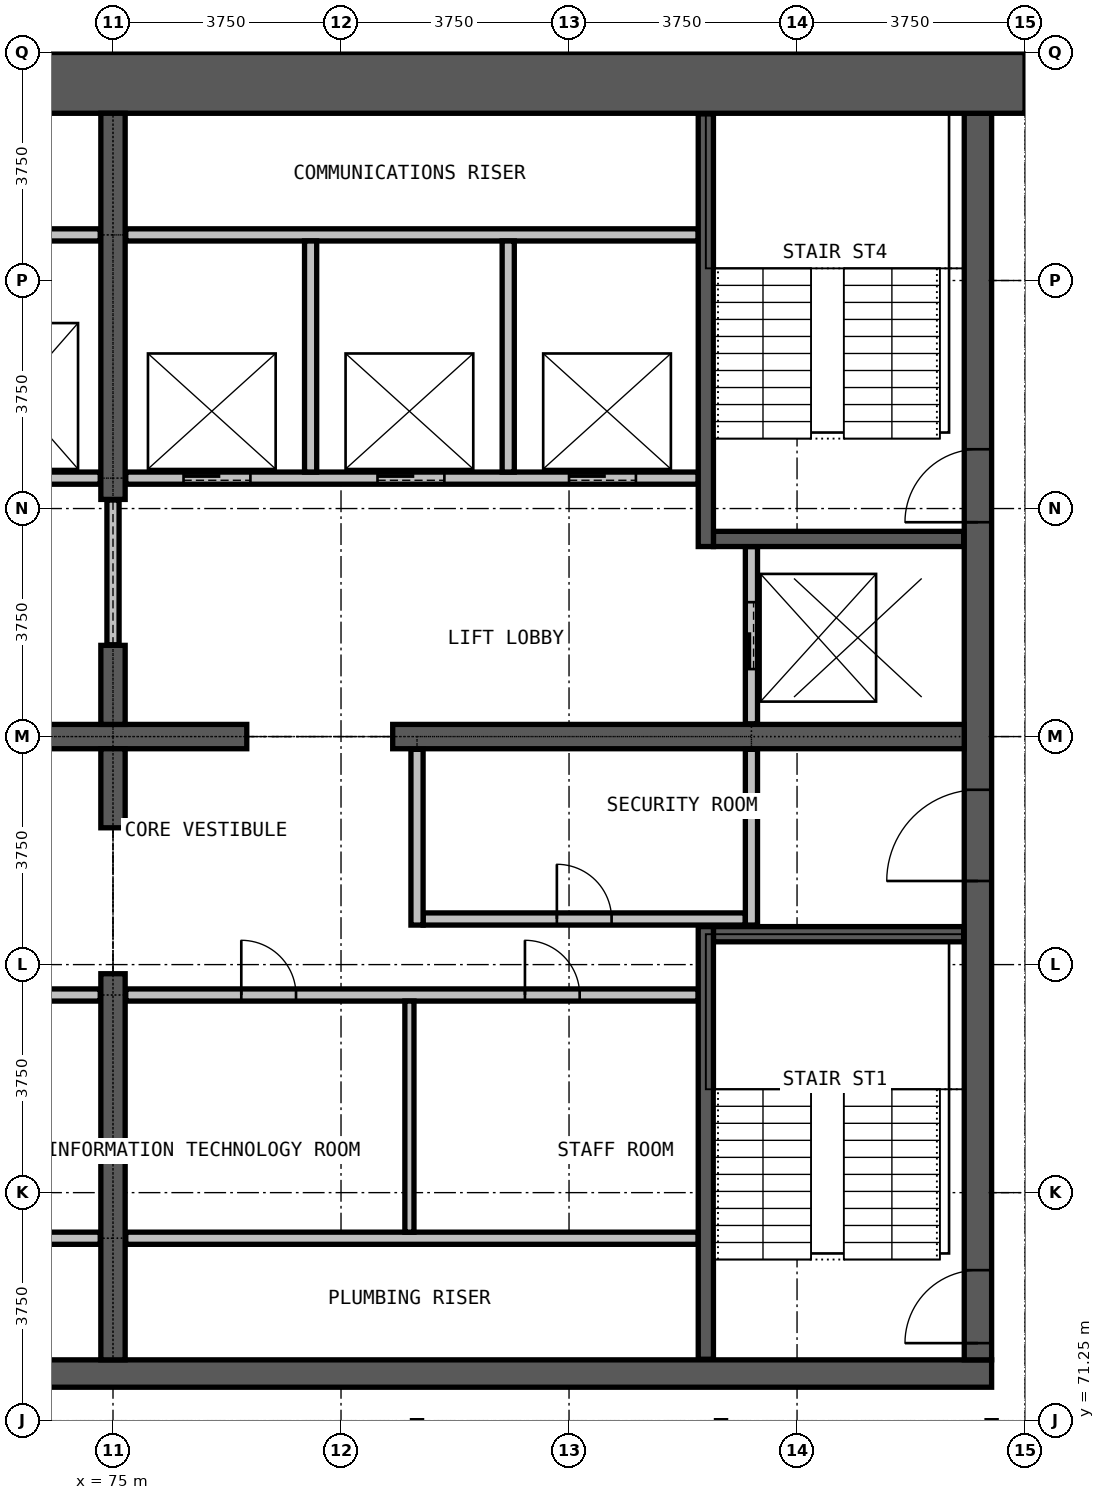
"""IFC4 building model, lengths in metres.
Left out: names, types, materials, properties, quantities, classifications, styles, units other than length and angle.
Written with IfcOpenShell. Run it as: python <this file> out.ifc"""

import sys

from ifc_helpers import new_model, si_unit, direction, frame, frame_2d, origin, place, context, subcontext, project, spatial, rectangle, extrude, element, fill, save


model = new_model("IFC4")
c1 = context("Model", 3, precision=1e-05, world=origin(), true_north=direction((0.0, 1.0)))
c2 = subcontext(c1, "Body", "Model", "MODEL_VIEW")
j1 = project(units=[si_unit("LENGTHUNIT", "METRE"), si_unit("PLANEANGLEUNIT", "RADIAN")], contexts=[c1])
p1 = place(None, origin())
s1 = spatial("IfcSite", under=j1, at=p1, CompositionType="ELEMENT")
p2 = place(p1, origin())
s2 = spatial("IfcBuilding", under=s1, at=p2, CompositionType="ELEMENT")
p3 = place(p2, frame((0.0, 0.0, 265.7)))
s3 = spatial("IfcBuildingStorey", under=s2, at=p3, CompositionType="ELEMENT", Elevation=265.7)
p4 = place(p3, frame((60.55, 72.025, 0.0), z_axis=(0.0, 0.0, 1.0), x_axis=(1.0, 0.0, 0.0)))
e1 = element("IfcWall", 1, at=p4, inside=s3, PredefinedType="SHEAR", context=c2, shape_type="SweptSolid", body=[
    extrude(rectangle(XDim=28.9, YDim=0.45, at=frame_2d((14.45, 0.0))), origin(), (0.0, 0.0, 1.0), 3.6),
])
p5 = place(p3, frame((89.225, 72.25, 0.0), z_axis=(0.0, 0.0, 1.0), x_axis=(0.0, 1.0, 0.0)))
e2 = element("IfcWall", 2, at=p5, inside=s3, PredefinedType="SHEAR", context=c2, shape_type="SweptSolid", body=[
    extrude(rectangle(XDim=20.5, YDim=0.45, at=frame_2d((10.25, 0.0))), origin(), (0.0, 0.0, 1.0), 3.6),
])
p6 = place(p5, frame((0.275, 0.0, 0.0)))
e3 = element("IfcOpeningElement", 3, at=p6, cuts=e2, PredefinedType="OPENING", context=c2, shape_type="SweptSolid", body=[
    extrude(rectangle(XDim=1.2, YDim=2.2, at=frame_2d((0.6, 1.1))), frame((0.0, 0.235, 0.0), z_axis=(0.0, -1.0, 0.0), x_axis=(1.0, 0.0, 0.0)), (0.0, 0.0, 1.0), 0.47),
])
p7 = place(p5, frame((13.775, 0.0, 0.0)))
e4 = element("IfcOpeningElement", 4, at=p7, cuts=e2, PredefinedType="OPENING", context=c2, shape_type="SweptSolid", body=[
    extrude(rectangle(XDim=1.2, YDim=2.2, at=frame_2d((0.6, 1.1))), frame((0.0, 0.235, 0.0), z_axis=(0.0, -1.0, 0.0), x_axis=(1.0, 0.0, 0.0)), (0.0, 0.0, 1.0), 0.47),
])
p8 = place(p5, frame((7.875, 0.0, 0.0)))
e5 = element("IfcOpeningElement", 5, at=p8, cuts=e2, PredefinedType="OPENING", context=c2, shape_type="SweptSolid", body=[
    extrude(rectangle(XDim=1.5, YDim=2.2, at=frame_2d((0.75, 1.1))), frame((0.0, 0.235, 0.0), z_axis=(0.0, -1.0, 0.0), x_axis=(1.0, 0.0, 0.0)), (0.0, 0.0, 1.0), 0.47),
])
p9 = place(p3, frame((90.0, 93.25, 0.0), z_axis=(0.0, 0.0, 1.0), x_axis=(-1.0, 0.0, 0.0)))
e6 = element("IfcWall", 6, at=p9, inside=s3, PredefinedType="SHEAR", context=c2, shape_type="SweptSolid", body=[
    extrude(rectangle(XDim=30.0, YDim=1.0, at=frame_2d((15.0, 0.0))), origin(), (0.0, 0.0, 1.0), 3.6),
])
p10 = place(p3, frame((72.8, 82.5, 0.0), z_axis=(0.0, 0.0, 1.0), x_axis=(1.0, 0.0, 0.0)))
e7 = element("IfcWall", 7, at=p10, inside=s3, PredefinedType="SHEAR", context=c2, shape_type="SweptSolid", body=[
    extrude(rectangle(XDim=4.4, YDim=0.4, at=frame_2d((2.2, 0.0))), origin(), (0.0, 0.0, 1.0), 3.6),
])
p11 = place(p3, frame((79.6, 82.5, 0.0), z_axis=(0.0, 0.0, 1.0), x_axis=(1.0, 0.0, 0.0)))
e8 = element("IfcWall", 8, at=p11, inside=s3, PredefinedType="SHEAR", context=c2, shape_type="SweptSolid", body=[
    extrude(rectangle(XDim=9.4, YDim=0.4, at=frame_2d((4.7, 0.0))), origin(), (0.0, 0.0, 1.0), 3.6),
])
p12 = place(p3, frame((75.0, 72.25, 0.0), z_axis=(0.0, 0.0, 1.0), x_axis=(0.0, 1.0, 0.0)))
e9 = element("IfcWall", 9, at=p12, inside=s3, PredefinedType="SHEAR", context=c2, shape_type="SweptSolid", body=[
    extrude(rectangle(XDim=6.35, YDim=0.4, at=frame_2d((3.175, 0.0))), origin(), (0.0, 0.0, 1.0), 3.6),
])
for number, where, z_axis, x_axis in (
    (10, (75.0, 81.0, 0.0), (0.0, 0.0, 1.0), (0.0, 1.0, 0.0)),
    (11, (75.0, 82.7, 0.0), (0.0, 0.0, 1.0), (0.0, 1.0, 0.0)),
):
    element("IfcWall", number, at=place(p3, frame(where, z_axis=z_axis, x_axis=x_axis)), inside=s3, PredefinedType="SHEAR", context=c2, shape_type="SweptSolid", body=[
        extrude(rectangle(XDim=1.3, YDim=0.4, at=frame_2d((0.65, 0.0))), origin(), (0.0, 0.0, 1.0), 3.6),
    ])
p13 = place(p3, frame((75.0, 86.4, 0.0), z_axis=(0.0, 0.0, 1.0), x_axis=(0.0, 1.0, 0.0)))
e12 = element("IfcWall", 12, at=p13, inside=s3, PredefinedType="SHEAR", context=c2, shape_type="SweptSolid", body=[
    extrude(rectangle(XDim=6.35, YDim=0.4, at=frame_2d((3.175, 0.0))), origin(), (0.0, 0.0, 1.0), 3.6),
])
for number, where, z_axis, x_axis in (
    (13, (65.375, 74.25, 0.0), (0.0, 0.0, 1.0), (1.0, 0.0, 0.0)),
    (14, (75.21, 74.25, 0.0), (0.0, 0.0, 1.0), (1.0, 0.0, 0.0)),
):
    element("IfcWall", number, at=place(p3, frame(where, z_axis=z_axis, x_axis=x_axis)), inside=s3, PredefinedType="PARTITIONING", context=c2, shape_type="SweptSolid", body=[
        extrude(rectangle(XDim=9.415, YDim=0.2, at=frame_2d((4.708, 0.0))), origin(), (0.0, 0.0, 1.0), 3.3),
    ])
p14 = place(p3, frame((65.375, 78.25, 0.0), z_axis=(0.0, 0.0, 1.0), x_axis=(1.0, 0.0, 0.0)))
e15 = element("IfcWall", 15, at=p14, inside=s3, PredefinedType="PARTITIONING", context=c2, shape_type="SweptSolid", body=[
    extrude(rectangle(XDim=9.415, YDim=0.2, at=frame_2d((4.708, 0.0))), origin(), (0.0, 0.0, 1.0), 3.3),
])
p15 = place(p14, frame((1.0, 0.0, 0.0)))
e16 = element("IfcOpeningElement", 16, at=p15, cuts=e15, PredefinedType="OPENING", context=c2, shape_type="SweptSolid", body=[
    extrude(rectangle(XDim=0.9, YDim=2.2, at=frame_2d((0.45, 1.1))), frame((0.0, 0.11, 0.0), z_axis=(0.0, -1.0, 0.0), x_axis=(1.0, 0.0, 0.0)), (0.0, 0.0, 1.0), 0.22),
])
p16 = place(p14, frame((5.665, 0.0, 0.0)))
e17 = element("IfcOpeningElement", 17, at=p16, cuts=e15, PredefinedType="OPENING", context=c2, shape_type="SweptSolid", body=[
    extrude(rectangle(XDim=0.9, YDim=2.2, at=frame_2d((0.45, 1.1))), frame((0.0, 0.11, 0.0), z_axis=(0.0, -1.0, 0.0), x_axis=(1.0, 0.0, 0.0)), (0.0, 0.0, 1.0), 0.22),
])
p17 = place(p3, frame((75.21, 78.25, 0.0), z_axis=(0.0, 0.0, 1.0), x_axis=(1.0, 0.0, 0.0)))
e18 = element("IfcWall", 18, at=p17, inside=s3, PredefinedType="PARTITIONING", context=c2, shape_type="SweptSolid", body=[
    extrude(rectangle(XDim=9.415, YDim=0.2, at=frame_2d((4.708, 0.0))), origin(), (0.0, 0.0, 1.0), 3.3),
])
p18 = place(p17, frame((1.9, 0.0, 0.0)))
e19 = element("IfcOpeningElement", 19, at=p18, cuts=e18, PredefinedType="OPENING", context=c2, shape_type="SweptSolid", body=[
    extrude(rectangle(XDim=0.9, YDim=2.2, at=frame_2d((0.45, 1.1))), frame((0.0, 0.11, 0.0), z_axis=(0.0, -1.0, 0.0), x_axis=(1.0, 0.0, 0.0)), (0.0, 0.0, 1.0), 0.22),
])
p19 = place(p17, frame((6.565, 0.0, 0.0)))
e20 = element("IfcOpeningElement", 20, at=p19, cuts=e18, PredefinedType="OPENING", context=c2, shape_type="SweptSolid", body=[
    extrude(rectangle(XDim=0.9, YDim=2.2, at=frame_2d((0.45, 1.1))), frame((0.0, 0.11, 0.0), z_axis=(0.0, -1.0, 0.0), x_axis=(1.0, 0.0, 0.0)), (0.0, 0.0, 1.0), 0.22),
])
p20 = place(p3, frame((80.1, 79.5, 0.0), z_axis=(0.0, 0.0, 1.0), x_axis=(1.0, 0.0, 0.0)))
e21 = element("IfcWall", 21, at=p20, inside=s3, PredefinedType="PARTITIONING", context=c2, shape_type="SweptSolid", body=[
    extrude(rectangle(XDim=5.3, YDim=0.2, at=frame_2d((2.65, 0.0))), origin(), (0.0, 0.0, 1.0), 3.3),
])
p21 = place(p20, frame((2.2, 0.0, 0.0)))
e22 = element("IfcOpeningElement", 22, at=p21, cuts=e21, PredefinedType="OPENING", context=c2, shape_type="SweptSolid", body=[
    extrude(rectangle(XDim=0.9, YDim=2.2, at=frame_2d((0.45, 1.1))), frame((0.0, 0.11, 0.0), z_axis=(0.0, -1.0, 0.0), x_axis=(1.0, 0.0, 0.0)), (0.0, 0.0, 1.0), 0.22),
])
p22 = place(p3, frame((75.0, 84.01, 0.0), z_axis=(0.0, 0.0, 1.0), x_axis=(0.0, 1.0, 0.0)))
e23 = element("IfcWall", 23, at=p22, inside=s3, PredefinedType="PARTITIONING", context=c2, shape_type="SweptSolid", body=[
    extrude(rectangle(XDim=2.38, YDim=0.2, at=frame_2d((1.19, 0.0))), origin(), (0.0, 0.0, 1.0), 2.4),
])
for number, where, z_axis, x_axis in (
    (24, (80.0, 79.4, 0.0), (0.0, 0.0, 1.0), (0.0, 1.0, 0.0)),
    (25, (85.5, 79.4, 0.0), (0.0, 0.0, 1.0), (0.0, 1.0, 0.0)),
):
    element("IfcWall", number, at=place(p3, frame(where, z_axis=z_axis, x_axis=x_axis)), inside=s3, PredefinedType="PARTITIONING", context=c2, shape_type="SweptSolid", body=[
        extrude(rectangle(XDim=2.89, YDim=0.2, at=frame_2d((1.445, 0.0))), origin(), (0.0, 0.0, 1.0), 3.3),
    ])
p23 = place(p3, frame((79.875, 74.35, 0.0), z_axis=(0.0, 0.0, 1.0), x_axis=(0.0, 1.0, 0.0)))
e26 = element("IfcWall", 26, at=p23, inside=s3, PredefinedType="PARTITIONING", context=c2, shape_type="SweptSolid", body=[
    extrude(rectangle(XDim=3.8, YDim=0.15, at=frame_2d((1.9, 0.0))), origin(), (0.0, 0.0, 1.0), 3.3),
])
p24 = place(p3, frame((89.45, 67.425, 0.0), z_axis=(0.0, 0.0, 1.0), x_axis=(0.0, 1.0, 0.0)))
e27 = element("IfcWall", 27, at=p24, inside=s3, PredefinedType="PARTITIONING", context=c2, shape_type="SweptSolid", body=[
    extrude(rectangle(XDim=3.825, YDim=0.15, at=frame_2d((1.913, 0.0))), origin(), (0.0, 0.0, 1.0), 3.3),
])
p25 = place(p3, frame((65.375, 86.75, 0.0), z_axis=(0.0, 0.0, 1.0), x_axis=(1.0, 0.0, 0.0)))
e28 = element("IfcWall", 28, at=p25, inside=s3, PredefinedType="PARTITIONING", context=c2, shape_type="SweptSolid", body=[
    extrude(rectangle(XDim=9.415, YDim=0.2, at=frame_2d((4.708, 0.0))), origin(), (0.0, 0.0, 1.0), 3.3),
])
p26 = place(p25, frame((1.0, 0.0, 0.0)))
e29 = element("IfcOpeningElement", 29, at=p26, cuts=e28, PredefinedType="OPENING", context=c2, shape_type="SweptSolid", body=[
    extrude(rectangle(XDim=1.1, YDim=2.2, at=frame_2d((0.55, 1.1))), frame((0.0, 0.11, 0.0), z_axis=(0.0, -1.0, 0.0), x_axis=(1.0, 0.0, 0.0)), (0.0, 0.0, 1.0), 0.22),
])
p27 = place(p25, frame((4.175, 0.0, 0.0)))
e30 = element("IfcOpeningElement", 30, at=p27, cuts=e28, PredefinedType="OPENING", context=c2, shape_type="SweptSolid", body=[
    extrude(rectangle(XDim=1.1, YDim=2.2, at=frame_2d((0.55, 1.1))), frame((0.0, 0.11, 0.0), z_axis=(0.0, -1.0, 0.0), x_axis=(1.0, 0.0, 0.0)), (0.0, 0.0, 1.0), 0.22),
])
p28 = place(p25, frame((7.325, 0.0, 0.0)))
e31 = element("IfcOpeningElement", 31, at=p28, cuts=e28, PredefinedType="OPENING", context=c2, shape_type="SweptSolid", body=[
    extrude(rectangle(XDim=1.1, YDim=2.2, at=frame_2d((0.55, 1.1))), frame((0.0, 0.11, 0.0), z_axis=(0.0, -1.0, 0.0), x_axis=(1.0, 0.0, 0.0)), (0.0, 0.0, 1.0), 0.22),
])
p29 = place(p3, frame((75.21, 86.75, 0.0), z_axis=(0.0, 0.0, 1.0), x_axis=(1.0, 0.0, 0.0)))
e32 = element("IfcWall", 32, at=p29, inside=s3, PredefinedType="PARTITIONING", context=c2, shape_type="SweptSolid", body=[
    extrude(rectangle(XDim=9.415, YDim=0.2, at=frame_2d((4.708, 0.0))), origin(), (0.0, 0.0, 1.0), 3.3),
])
p30 = place(p29, frame((0.95, 0.0, 0.0)))
e33 = element("IfcOpeningElement", 33, at=p30, cuts=e32, PredefinedType="OPENING", context=c2, shape_type="SweptSolid", body=[
    extrude(rectangle(XDim=1.1, YDim=2.2, at=frame_2d((0.55, 1.1))), frame((0.0, 0.11, 0.0), z_axis=(0.0, -1.0, 0.0), x_axis=(1.0, 0.0, 0.0)), (0.0, 0.0, 1.0), 0.22),
])
p31 = place(p29, frame((4.14, 0.0, 0.0)))
e34 = element("IfcOpeningElement", 34, at=p31, cuts=e32, PredefinedType="OPENING", context=c2, shape_type="SweptSolid", body=[
    extrude(rectangle(XDim=1.1, YDim=2.2, at=frame_2d((0.55, 1.1))), frame((0.0, 0.11, 0.0), z_axis=(0.0, -1.0, 0.0), x_axis=(1.0, 0.0, 0.0)), (0.0, 0.0, 1.0), 0.22),
])
p32 = place(p29, frame((7.29, 0.0, 0.0)))
e35 = element("IfcOpeningElement", 35, at=p32, cuts=e32, PredefinedType="OPENING", context=c2, shape_type="SweptSolid", body=[
    extrude(rectangle(XDim=1.1, YDim=2.2, at=frame_2d((0.55, 1.1))), frame((0.0, 0.11, 0.0), z_axis=(0.0, -1.0, 0.0), x_axis=(1.0, 0.0, 0.0)), (0.0, 0.0, 1.0), 0.22),
])
for number, where, z_axis, x_axis in (
    (36, (65.375, 90.75, 0.0), (0.0, 0.0, 1.0), (1.0, 0.0, 0.0)),
    (37, (75.21, 90.75, 0.0), (0.0, 0.0, 1.0), (1.0, 0.0, 0.0)),
):
    element("IfcWall", number, at=place(p3, frame(where, z_axis=z_axis, x_axis=x_axis)), inside=s3, PredefinedType="PARTITIONING", context=c2, shape_type="SweptSolid", body=[
        extrude(rectangle(XDim=9.415, YDim=0.2, at=frame_2d((4.708, 0.0))), origin(), (0.0, 0.0, 1.0), 3.3),
    ])
for number, where, z_axis, x_axis in (
    (38, (78.25, 86.85, 0.0), (0.0, 0.0, 1.0), (0.0, 1.0, 0.0)),
    (39, (81.5, 86.85, 0.0), (0.0, 0.0, 1.0), (0.0, 1.0, 0.0)),
):
    element("IfcWall", number, at=place(p3, frame(where, z_axis=z_axis, x_axis=x_axis)), inside=s3, PredefinedType="PARTITIONING", context=c2, shape_type="SweptSolid", body=[
        extrude(rectangle(XDim=3.8, YDim=0.2, at=frame_2d((1.9, 0.0))), origin(), (0.0, 0.0, 1.0), 3.3),
    ])
p33 = place(p3, frame((85.5, 82.71, 0.0), z_axis=(0.0, 0.0, 1.0), x_axis=(0.0, 1.0, 0.0)))
e40 = element("IfcWall", 40, at=p33, inside=s3, PredefinedType="PARTITIONING", context=c2, shape_type="SweptSolid", body=[
    extrude(rectangle(XDim=2.915, YDim=0.2, at=frame_2d((1.458, 0.0))), origin(), (0.0, 0.0, 1.0), 3.3),
])
p34 = place(p33, frame((0.9, 0.0, 0.0)))
e41 = element("IfcOpeningElement", 41, at=p34, cuts=e40, PredefinedType="OPENING", context=c2, shape_type="SweptSolid", body=[
    extrude(rectangle(XDim=1.1, YDim=2.2, at=frame_2d((0.55, 1.1))), frame((0.0, 0.11, 0.0), z_axis=(0.0, -1.0, 0.0), x_axis=(1.0, 0.0, 0.0)), (0.0, 0.0, 1.0), 0.22),
])
for number, where, z_axis, x_axis in (
    (42, (84.875, 79.25, 0.0), (0.0, 0.0, 1.0), (1.0, 0.0, 0.0)),
    (43, (84.875, 85.75, 0.0), (0.0, 0.0, 1.0), (1.0, 0.0, 0.0)),
):
    element("IfcWall", number, at=place(p3, frame(where, z_axis=z_axis, x_axis=x_axis)), inside=s3, PredefinedType="PARTITIONING", context=c2, shape_type="SweptSolid", body=[
        extrude(rectangle(XDim=4.115, YDim=0.25, at=frame_2d((2.058, 0.0))), origin(), (0.0, 0.0, 1.0), 3.3),
    ])
for number, where, z_axis, x_axis in (
    (44, (84.75, 72.26, 0.0), (0.0, 0.0, 1.0), (0.0, 1.0, 0.0)),
    (45, (84.75, 85.625, 0.0), (0.0, 0.0, 1.0), (0.0, 1.0, 0.0)),
):
    element("IfcWall", number, at=place(p3, frame(where, z_axis=z_axis, x_axis=x_axis)), inside=s3, PredefinedType="PARTITIONING", context=c2, shape_type="SweptSolid", body=[
        extrude(rectangle(XDim=7.115, YDim=0.25, at=frame_2d((3.558, 0.0))), origin(), (0.0, 0.0, 1.0), 3.3),
    ])
p35 = place(p30, origin())
e46 = element("IfcDoor", 46, at=p35, inside=s3, OperationType="DOUBLE_DOOR_SLIDING", PredefinedType="DOOR", context=c2, shape_type="SweptSolid", body=[
    extrude(rectangle(XDim=1.1, YDim=2.2, at=frame_2d((0.55, 1.1))), frame((0.0, 0.025, 0.0), z_axis=(0.0, -1.0, 0.0), x_axis=(1.0, 0.0, 0.0)), (0.0, 0.0, 1.0), 0.05),
])
fill(e33, e46)
p36 = place(p31, origin())
e47 = element("IfcDoor", 47, at=p36, inside=s3, OperationType="DOUBLE_DOOR_SLIDING", PredefinedType="DOOR", context=c2, shape_type="SweptSolid", body=[
    extrude(rectangle(XDim=1.1, YDim=2.2, at=frame_2d((0.55, 1.1))), frame((0.0, 0.025, 0.0), z_axis=(0.0, -1.0, 0.0), x_axis=(1.0, 0.0, 0.0)), (0.0, 0.0, 1.0), 0.05),
])
fill(e34, e47)
p37 = place(p32, origin())
e48 = element("IfcDoor", 48, at=p37, inside=s3, OperationType="DOUBLE_DOOR_SLIDING", PredefinedType="DOOR", context=c2, shape_type="SweptSolid", body=[
    extrude(rectangle(XDim=1.1, YDim=2.2, at=frame_2d((0.55, 1.1))), frame((0.0, 0.025, 0.0), z_axis=(0.0, -1.0, 0.0), x_axis=(1.0, 0.0, 0.0)), (0.0, 0.0, 1.0), 0.05),
])
fill(e35, e48)
p38 = place(p34, origin())
e49 = element("IfcDoor", 49, at=p38, inside=s3, OperationType="DOUBLE_DOOR_SLIDING", PredefinedType="DOOR", context=c2, shape_type="SweptSolid", body=[
    extrude(rectangle(XDim=1.1, YDim=2.2, at=frame_2d((0.55, 1.1))), frame((0.0, 0.025, 0.0), z_axis=(0.0, -1.0, 0.0), x_axis=(1.0, 0.0, 0.0)), (0.0, 0.0, 1.0), 0.05),
])
fill(e41, e49)
p39 = place(p6, origin())
e50 = element("IfcDoor", 50, at=p39, inside=s3, OperationType="SINGLE_SWING_RIGHT", PredefinedType="DOOR", context=c2, shape_type="SweptSolid", body=[
    extrude(rectangle(XDim=1.2, YDim=2.2, at=frame_2d((0.6, 1.1))), frame((0.0, 0.025, 0.0), z_axis=(0.0, -1.0, 0.0), x_axis=(1.0, 0.0, 0.0)), (0.0, 0.0, 1.0), 0.05),
])
fill(e3, e50)
p40 = place(p7, origin())
e51 = element("IfcDoor", 51, at=p40, inside=s3, OperationType="SINGLE_SWING_LEFT", PredefinedType="DOOR", context=c2, shape_type="SweptSolid", body=[
    extrude(rectangle(XDim=1.2, YDim=2.2, at=frame_2d((0.6, 1.1))), frame((0.0, 0.025, 0.0), z_axis=(0.0, -1.0, 0.0), x_axis=(1.0, 0.0, 0.0)), (0.0, 0.0, 1.0), 0.05),
])
fill(e4, e51)
p41 = place(p8, origin())
e52 = element("IfcDoor", 52, at=p41, inside=s3, OperationType="DOUBLE_DOOR_SINGLE_SWING", PredefinedType="DOOR", context=c2, shape_type="SweptSolid", body=[
    extrude(rectangle(XDim=1.5, YDim=2.2, at=frame_2d((0.75, 1.1))), frame((0.0, 0.025, 0.0), z_axis=(0.0, -1.0, 0.0), x_axis=(1.0, 0.0, 0.0)), (0.0, 0.0, 1.0), 0.05),
])
fill(e5, e52)
p42 = place(p21, origin())
e53 = element("IfcDoor", 53, at=p42, inside=s3, OperationType="SINGLE_SWING_RIGHT", PredefinedType="DOOR", context=c2, shape_type="SweptSolid", body=[
    extrude(rectangle(XDim=0.9, YDim=2.2, at=frame_2d((0.45, 1.1))), frame((0.0, 0.025, 0.0), z_axis=(0.0, -1.0, 0.0), x_axis=(1.0, 0.0, 0.0)), (0.0, 0.0, 1.0), 0.05),
])
fill(e22, e53)
p43 = place(p18, origin())
e54 = element("IfcDoor", 54, at=p43, inside=s3, OperationType="SINGLE_SWING_LEFT", PredefinedType="DOOR", context=c2, shape_type="SweptSolid", body=[
    extrude(rectangle(XDim=0.9, YDim=2.2, at=frame_2d((0.45, 1.1))), frame((0.0, 0.025, 0.0), z_axis=(0.0, -1.0, 0.0), x_axis=(1.0, 0.0, 0.0)), (0.0, 0.0, 1.0), 0.05),
])
fill(e19, e54)
p44 = place(p19, origin())
e55 = element("IfcDoor", 55, at=p44, inside=s3, OperationType="SINGLE_SWING_LEFT", PredefinedType="DOOR", context=c2, shape_type="SweptSolid", body=[
    extrude(rectangle(XDim=0.9, YDim=2.2, at=frame_2d((0.45, 1.1))), frame((0.0, 0.025, 0.0), z_axis=(0.0, -1.0, 0.0), x_axis=(1.0, 0.0, 0.0)), (0.0, 0.0, 1.0), 0.05),
])
fill(e20, e55)
save(model, sys.argv[1])
